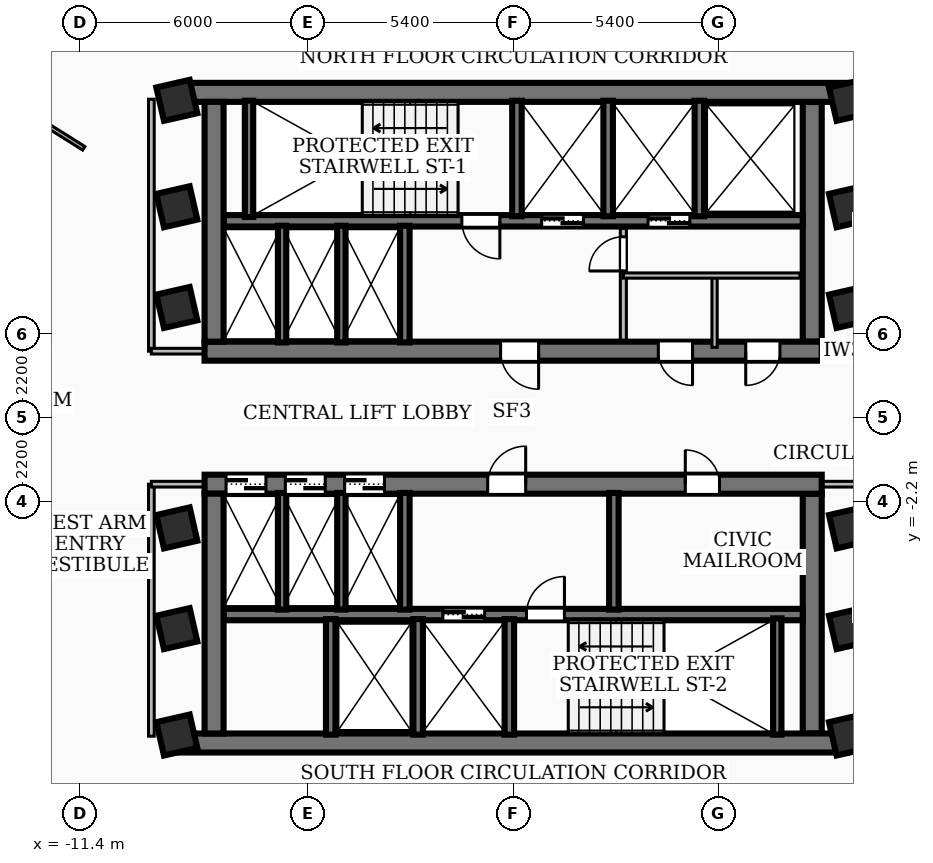
"""IFC4 building model, lengths in metres.
Left out: names, types, materials, properties, quantities, classifications, styles, units other than length and angle.
Written with IfcOpenShell. Run it as: python <this file> out.ifc"""

import sys

from ifc_helpers import new_model, si_unit, direction, frame, frame_2d, origin, origin_2d, place, context, subcontext, project, spatial, rectangle, extrude, element, fill, save


model = new_model("IFC4")
c1 = context("Model", 3, precision=1e-05, world=origin(), true_north=direction((0.0, 1.0)))
c2 = subcontext(c1, "Body", "Model", "MODEL_VIEW")
j1 = project(units=[si_unit("LENGTHUNIT", "METRE"), si_unit("PLANEANGLEUNIT", "RADIAN")], contexts=[c1])
p1 = place(None, origin())
s1 = spatial("IfcSite", under=j1, at=p1, CompositionType="ELEMENT")
p2 = place(p1, origin())
s2 = spatial("IfcBuilding", under=s1, at=p2, CompositionType="ELEMENT")
p3 = place(p2, frame((0.0, 0.0, 123.48)))
s3 = spatial("IfcBuildingStorey", under=s2, at=p3, CompositionType="ELEMENT", Elevation=123.48)
p4 = place(p3, frame((-8.78, 8.56, 0.0), z_axis=(0.0, 0.0, 1.0), x_axis=(1.0, 0.0, 0.0)))
e1 = element("IfcWall", 1, at=p4, inside=s3, PredefinedType="SHEAR", context=c2, shape_type="SweptSolid", body=[
    extrude(rectangle(XDim=17.56, YDim=0.5, at=frame_2d((8.78, 0.0))), origin(), (0.0, 0.0, 1.0), 3.34),
])
p5 = place(p3, frame((8.12, 1.75, 0.0), z_axis=(0.0, 0.0, 1.0), x_axis=(-1.0, 0.0, 0.0)))
e2 = element("IfcWall", 2, at=p5, inside=s3, PredefinedType="SHEAR", context=c2, shape_type="SweptSolid", body=[
    extrude(rectangle(XDim=16.24, YDim=0.5, at=frame_2d((8.12, 0.0))), origin(), (0.0, 0.0, 1.0), 3.34),
])
p6 = place(p5, frame((7.45, 0.0, 0.0)))
e3 = element("IfcOpeningElement", 3, at=p6, cuts=e2, PredefinedType="OPENING", context=c2, shape_type="SweptSolid", body=[
    extrude(rectangle(XDim=1.0, YDim=2.1, at=frame_2d((0.5, 1.05))), frame((0.0, 0.26, 0.0), z_axis=(0.0, -1.0, 0.0), x_axis=(1.0, 0.0, 0.0)), (0.0, 0.0, 1.0), 0.52),
])
p7 = place(p5, frame((3.4, 0.0, 0.0)))
e4 = element("IfcOpeningElement", 4, at=p7, cuts=e2, PredefinedType="OPENING", context=c2, shape_type="SweptSolid", body=[
    extrude(rectangle(XDim=0.9, YDim=2.06, at=frame_2d((0.45, 1.03))), frame((0.0, 0.26, 0.0), z_axis=(0.0, -1.0, 0.0), x_axis=(1.0, 0.0, 0.0)), (0.0, 0.0, 1.0), 0.52),
])
p8 = place(p5, frame((1.1, 0.0, 0.0)))
e5 = element("IfcOpeningElement", 5, at=p8, cuts=e2, PredefinedType="OPENING", context=c2, shape_type="SweptSolid", body=[
    extrude(rectangle(XDim=0.9, YDim=2.06, at=frame_2d((0.45, 1.03))), frame((0.0, 0.26, 0.0), z_axis=(0.0, -1.0, 0.0), x_axis=(1.0, 0.0, 0.0)), (0.0, 0.0, 1.0), 0.52),
])
for number, where, z_axis, x_axis in (
    (6, (-7.87, 2.0, 0.0), (0.0, 0.0, 1.0), (0.0, 1.0, 0.0)),
    (7, (7.87, 8.31, 0.0), (0.0, 0.0, 1.0), (0.0, -1.0, 0.0)),
):
    element("IfcWall", number, at=place(p3, frame(where, z_axis=z_axis, x_axis=x_axis)), inside=s3, PredefinedType="SHEAR", context=c2, shape_type="SweptSolid", body=[
        extrude(rectangle(XDim=6.31, YDim=0.5, at=frame_2d((3.155, 0.0))), origin(), (0.0, 0.0, 1.0), 3.34),
    ])
p9 = place(p3, frame((7.62, 5.18, 0.0), z_axis=(0.0, 0.0, 1.0), x_axis=(-1.0, 0.0, 0.0)))
e8 = element("IfcWall", 8, at=p9, inside=s3, PredefinedType="SOLIDWALL", context=c2, shape_type="SweptSolid", body=[
    extrude(rectangle(XDim=15.24, YDim=0.3, at=frame_2d((7.62, 0.0))), origin(), (0.0, 0.0, 1.0), 3.34),
])
p10 = place(p9, frame((5.77, 0.0, 0.0)))
e9 = element("IfcOpeningElement", 9, at=p10, cuts=e8, PredefinedType="OPENING", context=c2, shape_type="SweptSolid", body=[
    extrude(rectangle(XDim=1.1, YDim=2.15, at=frame_2d((0.55, 1.075))), frame((0.0, 0.16, 0.0), z_axis=(0.0, -1.0, 0.0), x_axis=(1.0, 0.0, 0.0)), (0.0, 0.0, 1.0), 0.32),
])
p11 = place(p9, frame((2.97, 0.0, 0.0)))
e10 = element("IfcOpeningElement", 10, at=p11, cuts=e8, PredefinedType="OPENING", context=c2, shape_type="SweptSolid", body=[
    extrude(rectangle(XDim=1.1, YDim=2.15, at=frame_2d((0.55, 1.075))), frame((0.0, 0.16, 0.0), z_axis=(0.0, -1.0, 0.0), x_axis=(1.0, 0.0, 0.0)), (0.0, 0.0, 1.0), 0.32),
])
p12 = place(p9, frame((7.97, 0.0, 0.0)))
e11 = element("IfcOpeningElement", 11, at=p12, cuts=e8, PredefinedType="OPENING", context=c2, shape_type="SweptSolid", body=[
    extrude(rectangle(XDim=1.0, YDim=2.1, at=frame_2d((0.5, 1.05))), frame((0.0, 0.16, 0.0), z_axis=(0.0, -1.0, 0.0), x_axis=(1.0, 0.0, 0.0)), (0.0, 0.0, 1.0), 0.32),
])
p13 = place(p3, frame((8.78, -8.56, 0.0), z_axis=(0.0, 0.0, 1.0), x_axis=(-1.0, 0.0, 0.0)))
e12 = element("IfcWall", 12, at=p13, inside=s3, PredefinedType="SHEAR", context=c2, shape_type="SweptSolid", body=[
    extrude(rectangle(XDim=17.56, YDim=0.5, at=frame_2d((8.78, 0.0))), origin(), (0.0, 0.0, 1.0), 3.34),
])
p14 = place(p3, frame((-8.12, -1.75, 0.0), z_axis=(0.0, 0.0, 1.0), x_axis=(1.0, 0.0, 0.0)))
e13 = element("IfcWall", 13, at=p14, inside=s3, PredefinedType="SHEAR", context=c2, shape_type="SweptSolid", body=[
    extrude(rectangle(XDim=16.24, YDim=0.5, at=frame_2d((8.12, 0.0))), origin(), (0.0, 0.0, 1.0), 3.34),
])
p15 = place(p14, frame((7.45, 0.0, 0.0)))
e14 = element("IfcOpeningElement", 14, at=p15, cuts=e13, PredefinedType="OPENING", context=c2, shape_type="SweptSolid", body=[
    extrude(rectangle(XDim=1.0, YDim=2.1, at=frame_2d((0.5, 1.05))), frame((0.0, 0.26, 0.0), z_axis=(0.0, -1.0, 0.0), x_axis=(1.0, 0.0, 0.0)), (0.0, 0.0, 1.0), 0.52),
])
p16 = place(p14, frame((12.65, 0.0, 0.0)))
e15 = element("IfcOpeningElement", 15, at=p16, cuts=e13, PredefinedType="OPENING", context=c2, shape_type="SweptSolid", body=[
    extrude(rectangle(XDim=0.9, YDim=2.06, at=frame_2d((0.45, 1.03))), frame((0.0, 0.26, 0.0), z_axis=(0.0, -1.0, 0.0), x_axis=(1.0, 0.0, 0.0)), (0.0, 0.0, 1.0), 0.52),
])
p17 = place(p14, frame((0.565, 0.0, 0.0)))
e16 = element("IfcOpeningElement", 16, at=p17, cuts=e13, PredefinedType="OPENING", context=c2, shape_type="SweptSolid", body=[
    extrude(rectangle(XDim=1.05, YDim=2.15, at=frame_2d((0.525, 1.075))), frame((0.0, 0.26, 0.0), z_axis=(0.0, -1.0, 0.0), x_axis=(1.0, 0.0, 0.0)), (0.0, 0.0, 1.0), 0.52),
])
p18 = place(p14, frame((2.125, 0.0, 0.0)))
e17 = element("IfcOpeningElement", 17, at=p18, cuts=e13, PredefinedType="OPENING", context=c2, shape_type="SweptSolid", body=[
    extrude(rectangle(XDim=1.05, YDim=2.15, at=frame_2d((0.525, 1.075))), frame((0.0, 0.26, 0.0), z_axis=(0.0, -1.0, 0.0), x_axis=(1.0, 0.0, 0.0)), (0.0, 0.0, 1.0), 0.52),
])
p19 = place(p14, frame((3.685, 0.0, 0.0)))
e18 = element("IfcOpeningElement", 18, at=p19, cuts=e13, PredefinedType="OPENING", context=c2, shape_type="SweptSolid", body=[
    extrude(rectangle(XDim=1.05, YDim=2.15, at=frame_2d((0.525, 1.075))), frame((0.0, 0.26, 0.0), z_axis=(0.0, -1.0, 0.0), x_axis=(1.0, 0.0, 0.0)), (0.0, 0.0, 1.0), 0.52),
])
for number, where, z_axis, x_axis in (
    (19, (-7.87, -8.31, 0.0), (0.0, 0.0, 1.0), (0.0, 1.0, 0.0)),
    (20, (7.87, -2.0, 0.0), (0.0, 0.0, 1.0), (0.0, -1.0, 0.0)),
):
    element("IfcWall", number, at=place(p3, frame(where, z_axis=z_axis, x_axis=x_axis)), inside=s3, PredefinedType="SHEAR", context=c2, shape_type="SweptSolid", body=[
        extrude(rectangle(XDim=6.31, YDim=0.5, at=frame_2d((3.155, 0.0))), origin(), (0.0, 0.0, 1.0), 3.34),
    ])
p20 = place(p3, frame((-7.62, -5.18, 0.0), z_axis=(0.0, 0.0, 1.0), x_axis=(1.0, 0.0, 0.0)))
e21 = element("IfcWall", 21, at=p20, inside=s3, PredefinedType="SOLIDWALL", context=c2, shape_type="SweptSolid", body=[
    extrude(rectangle(XDim=15.24, YDim=0.3, at=frame_2d((7.62, 0.0))), origin(), (0.0, 0.0, 1.0), 3.34),
])
p21 = place(p20, frame((5.77, 0.0, 0.0)))
e22 = element("IfcOpeningElement", 22, at=p21, cuts=e21, PredefinedType="OPENING", context=c2, shape_type="SweptSolid", body=[
    extrude(rectangle(XDim=1.1, YDim=2.15, at=frame_2d((0.55, 1.075))), frame((0.0, 0.16, 0.0), z_axis=(0.0, -1.0, 0.0), x_axis=(1.0, 0.0, 0.0)), (0.0, 0.0, 1.0), 0.32),
])
p22 = place(p20, frame((7.97, 0.0, 0.0)))
e23 = element("IfcOpeningElement", 23, at=p22, cuts=e21, PredefinedType="OPENING", context=c2, shape_type="SweptSolid", body=[
    extrude(rectangle(XDim=1.0, YDim=2.1, at=frame_2d((0.5, 1.05))), frame((0.0, 0.16, 0.0), z_axis=(0.0, -1.0, 0.0), x_axis=(1.0, 0.0, 0.0)), (0.0, 0.0, 1.0), 0.32),
])
for number, where, z_axis, x_axis in (
    (24, (-6.95, 5.28, 0.0), (0.0, 0.0, 1.0), (0.0, 1.0, 0.0)),
    (25, (6.95, -8.34, 0.0), (0.0, 0.0, 1.0), (0.0, 1.0, 0.0)),
):
    element("IfcWall", number, at=place(p3, frame(where, z_axis=z_axis, x_axis=x_axis)), inside=s3, PredefinedType="SOLIDWALL", context=c2, shape_type="SweptSolid", body=[
        extrude(rectangle(XDim=3.06, YDim=0.22, at=frame_2d((1.53, 0.0))), origin(), (0.0, 0.0, 1.0), 3.34),
    ])
for number, where, z_axis, x_axis in (
    (26, (0.1, 5.3, 0.0), (0.0, 0.0, 1.0), (0.0, 1.0, 0.0)),
    (27, (2.5, 5.3, 0.0), (0.0, 0.0, 1.0), (0.0, 1.0, 0.0)),
    (28, (4.9, 5.3, 0.0), (0.0, 0.0, 1.0), (0.0, 1.0, 0.0)),
):
    element("IfcWall", number, at=place(p3, frame(where, z_axis=z_axis, x_axis=x_axis)), inside=s3, PredefinedType="SOLIDWALL", context=c2, shape_type="SweptSolid", body=[
        extrude(rectangle(XDim=3.04, YDim=0.25, at=frame_2d((1.52, 0.0))), origin(), (0.0, 0.0, 1.0), 3.34),
    ])
p23 = place(p3, frame((-2.85, 1.98, 0.0), z_axis=(0.0, 0.0, 1.0), x_axis=(0.0, 1.0, 0.0)))
e29 = element("IfcWall", 29, at=p23, inside=s3, PredefinedType="SOLIDWALL", context=c2, shape_type="SweptSolid", body=[
    extrude(rectangle(XDim=3.07, YDim=0.25, at=frame_2d((1.535, 0.0))), origin(), (0.0, 0.0, 1.0), 3.34),
])
for number, where, z_axis, x_axis in (
    (30, (-0.1, -8.34, 0.0), (0.0, 0.0, 1.0), (0.0, 1.0, 0.0)),
    (31, (-2.5, -8.34, 0.0), (0.0, 0.0, 1.0), (0.0, 1.0, 0.0)),
    (32, (-4.8, -8.34, 0.0), (0.0, 0.0, 1.0), (0.0, 1.0, 0.0)),
):
    element("IfcWall", number, at=place(p3, frame(where, z_axis=z_axis, x_axis=x_axis)), inside=s3, PredefinedType="SOLIDWALL", context=c2, shape_type="SweptSolid", body=[
        extrude(rectangle(XDim=3.04, YDim=0.25, at=frame_2d((1.52, 0.0))), origin(), (0.0, 0.0, 1.0), 3.34),
    ])
for number, where, z_axis, x_axis in (
    (33, (-2.85, -5.05, 0.0), (0.0, 0.0, 1.0), (0.0, 1.0, 0.0)),
    (34, (2.65, -5.05, 0.0), (0.0, 0.0, 1.0), (0.0, 1.0, 0.0)),
):
    element("IfcWall", number, at=place(p3, frame(where, z_axis=z_axis, x_axis=x_axis)), inside=s3, PredefinedType="SOLIDWALL", context=c2, shape_type="SweptSolid", body=[
        extrude(rectangle(XDim=3.07, YDim=0.25, at=frame_2d((1.535, 0.0))), origin(), (0.0, 0.0, 1.0), 3.34),
    ])
for number, where, z_axis, x_axis in (
    (35, (-6.08, 1.98, 0.0), (0.0, 0.0, 1.0), (0.0, 1.0, 0.0)),
    (36, (-4.52, 1.98, 0.0), (0.0, 0.0, 1.0), (0.0, 1.0, 0.0)),
    (37, (-6.08, -5.05, 0.0), (0.0, 0.0, 1.0), (0.0, 1.0, 0.0)),
    (38, (-4.52, -5.05, 0.0), (0.0, 0.0, 1.0), (0.0, 1.0, 0.0)),
):
    element("IfcWall", number, at=place(p3, frame(where, z_axis=z_axis, x_axis=x_axis)), inside=s3, PredefinedType="SOLIDWALL", context=c2, shape_type="SweptSolid", body=[
        extrude(rectangle(XDim=3.07, YDim=0.22, at=frame_2d((1.535, 0.0))), origin(), (0.0, 0.0, 1.0), 3.34),
    ])
for number, where, z_axis, x_axis in (
    (39, (-8.85, -5.55, 0.0), (0.0, 0.0, 1.0), (0.975, 0.223, 0.0)),
    (40, (-8.85, -2.9, 0.0), (0.0, 0.0, 1.0), (0.975, 0.223, 0.0)),
    (41, (-8.85, 2.9, 0.0), (0.0, 0.0, 1.0), (0.975, 0.223, 0.0)),
    (42, (-8.85, 5.55, 0.0), (0.0, 0.0, 1.0), (0.975, 0.223, 0.0)),
    (43, (8.85, -5.55, 0.0), (0.0, 0.0, 1.0), (0.975, 0.223, 0.0)),
    (44, (8.85, -2.9, 0.0), (0.0, 0.0, 1.0), (0.975, 0.223, 0.0)),
    (45, (8.85, 2.9, 0.0), (0.0, 0.0, 1.0), (0.975, 0.223, 0.0)),
    (46, (8.85, 5.55, 0.0), (0.0, 0.0, 1.0), (0.975, 0.223, 0.0)),
    (47, (-8.85, 8.35, 0.0), (0.0, 0.0, 1.0), (0.975, 0.223, 0.0)),
    (48, (8.85, -8.35, 0.0), (0.0, 0.0, 1.0), (0.975, 0.223, 0.0)),
    (49, (8.85, 8.35, 0.0), (0.0, 0.0, 1.0), (0.975, 0.223, 0.0)),
    (50, (-8.85, -8.35, 0.0), (0.0, 0.0, 1.0), (0.975, 0.223, 0.0)),
):
    element("IfcColumn", number, at=place(p3, frame(where, z_axis=z_axis, x_axis=x_axis)), inside=s3, PredefinedType="COLUMN", context=c2, shape_type="SweptSolid", body=[
        extrude(rectangle(XDim=0.9, YDim=0.9, at=origin_2d()), origin(), (0.0, 0.0, 1.0), 3.6),
    ])
p24 = place(p3, frame((-11.182, -15.857, 0.0), z_axis=(0.0, 0.0, 1.0), x_axis=(-0.223278912438, 0.974754598481, 0.0)))
e51 = element("IfcWall", 51, at=p24, inside=s3, PredefinedType="SOLIDWALL", context=c2, shape_type="SweptSolid", body=[
    extrude(rectangle(XDim=6.759, YDim=0.22, at=frame_2d((3.379, 0.0))), origin(), (0.0, 0.0, 1.0), 2.644),
])
p25 = place(p3, frame((2.9, 2.04, 0.0), z_axis=(0.0, 0.0, 1.0), x_axis=(0.0, 1.0, 0.0)))
e52 = element("IfcWall", 52, at=p25, inside=s3, PredefinedType="PARTITIONING", context=c2, shape_type="SweptSolid", body=[
    extrude(rectangle(XDim=2.94, YDim=0.16, at=frame_2d((1.47, 0.0))), origin(), (0.0, 0.0, 1.0), 2.57),
])
p26 = place(p25, frame((1.82, 0.0, 0.0)))
e53 = element("IfcOpeningElement", 53, at=p26, cuts=e52, PredefinedType="OPENING", context=c2, shape_type="SweptSolid", body=[
    extrude(rectangle(XDim=0.9, YDim=2.06, at=frame_2d((0.45, 1.03))), frame((0.0, 0.09, 0.0), z_axis=(0.0, -1.0, 0.0), x_axis=(1.0, 0.0, 0.0)), (0.0, 0.0, 1.0), 0.18),
])
p27 = place(p3, frame((2.9, 3.74, 0.0), z_axis=(0.0, 0.0, 1.0), x_axis=(1.0, 0.0, 0.0)))
e54 = element("IfcWall", 54, at=p27, inside=s3, PredefinedType="PARTITIONING", context=c2, shape_type="SweptSolid", body=[
    extrude(rectangle(XDim=4.65, YDim=0.138, at=frame_2d((2.325, 0.0))), origin(), (0.0, 0.0, 1.0), 3.34),
])
p28 = place(p3, frame((5.3, 1.85, 0.0), z_axis=(0.0, 0.0, 1.0), x_axis=(0.0, 1.0, 0.0)))
e55 = element("IfcWall", 55, at=p28, inside=s3, PredefinedType="PARTITIONING", context=c2, shape_type="SweptSolid", body=[
    extrude(rectangle(XDim=1.89, YDim=0.138, at=frame_2d((0.945, 0.0))), origin(), (0.0, 0.0, 1.0), 2.57),
])
p29 = place(p3, frame((-9.52, 1.75, 0.0), z_axis=(0.0, 0.0, 1.0), x_axis=(0.0, 1.0, 0.0)))
e56 = element("IfcWall", 56, at=p29, inside=s3, PredefinedType="PARTITIONING", context=c2, shape_type="SweptSolid", body=[
    extrude(rectangle(XDim=6.63, YDim=0.15, at=frame_2d((3.315, 0.0))), origin(), (0.0, 0.0, 1.0), 2.57),
])
p30 = place(p3, frame((-7.85, 1.75, 0.0), z_axis=(0.0, 0.0, 1.0), x_axis=(-1.0, 0.0, 0.0)))
e57 = element("IfcWall", 57, at=p30, inside=s3, PredefinedType="PARTITIONING", context=c2, shape_type="SweptSolid", body=[
    extrude(rectangle(XDim=1.67, YDim=0.15, at=frame_2d((0.835, 0.0))), origin(), (0.0, 0.0, 1.0), 2.57),
])
p31 = place(p3, frame((-9.52, -8.38, 0.0), z_axis=(0.0, 0.0, 1.0), x_axis=(0.0, 1.0, 0.0)))
e58 = element("IfcWall", 58, at=p31, inside=s3, PredefinedType="PARTITIONING", context=c2, shape_type="SweptSolid", body=[
    extrude(rectangle(XDim=6.63, YDim=0.15, at=frame_2d((3.315, 0.0))), origin(), (0.0, 0.0, 1.0), 2.57),
])
for number, where, z_axis, x_axis in (
    (59, (-7.85, -1.75, 0.0), (0.0, 0.0, 1.0), (-1.0, 0.0, 0.0)),
    (60, (7.85, 1.75, 0.0), (0.0, 0.0, 1.0), (1.0, 0.0, 0.0)),
    (61, (7.85, -1.75, 0.0), (0.0, 0.0, 1.0), (1.0, 0.0, 0.0)),
):
    element("IfcWall", number, at=place(p3, frame(where, z_axis=z_axis, x_axis=x_axis)), inside=s3, PredefinedType="PARTITIONING", context=c2, shape_type="SweptSolid", body=[
        extrude(rectangle(XDim=1.67, YDim=0.15, at=frame_2d((0.835, 0.0))), origin(), (0.0, 0.0, 1.0), 2.57),
    ])
p32 = place(p3, frame((-11.3, 7.089, 0.0), z_axis=(0.0, 0.0, 1.0), x_axis=(-0.847172398776, 0.531318103167, 0.0)))
e62 = element("IfcWall", 62, at=p32, inside=s3, PredefinedType="PARTITIONING", context=c2, shape_type="SweptSolid", body=[
    extrude(rectangle(XDim=6.335, YDim=0.11, at=frame_2d((3.167, 0.0))), origin(), (0.0, 0.0, 1.0), 3.34),
])
p33 = place(p3, frame((-11.692, -12.957, 0.0), z_axis=(0.0, 0.0, 1.0), x_axis=(-0.223262093598, 0.97475845088, 0.0)))
e63 = element("IfcWall", 63, at=p33, inside=s3, PredefinedType="PARTITIONING", context=c2, shape_type="SweptSolid", body=[
    extrude(rectangle(XDim=20.04, YDim=0.11, at=frame_2d((10.02, 0.0))), origin(), (0.0, 0.0, 1.0), 2.57),
])
p34 = place(p33, frame((9.42, 0.0, 0.0)))
e64 = element("IfcOpeningElement", 64, at=p34, cuts=e63, PredefinedType="OPENING", context=c2, shape_type="SweptSolid", body=[
    extrude(rectangle(XDim=1.2, YDim=2.1, at=frame_2d((0.6, 1.05))), frame((0.0, 0.065, 0.0), z_axis=(0.0, -1.0, 0.0), x_axis=(1.0, 0.0, 0.0)), (0.0, 0.0, 1.0), 0.13),
])
p35 = place(p6, origin())
e65 = element("IfcDoor", 65, at=p35, inside=s3, OperationType="SINGLE_SWING_LEFT", PredefinedType="DOOR", context=c2, shape_type="SweptSolid", body=[
    extrude(rectangle(XDim=1.0, YDim=2.1, at=frame_2d((0.5, 1.05))), frame((0.0, 0.025, 0.0), z_axis=(0.0, -1.0, 0.0), x_axis=(1.0, 0.0, 0.0)), (0.0, 0.0, 1.0), 0.05),
])
fill(e3, e65)
p36 = place(p15, origin())
e66 = element("IfcDoor", 66, at=p36, inside=s3, OperationType="SINGLE_SWING_RIGHT", PredefinedType="DOOR", context=c2, shape_type="SweptSolid", body=[
    extrude(rectangle(XDim=1.0, YDim=2.1, at=frame_2d((0.5, 1.05))), frame((0.0, 0.025, 0.0), z_axis=(0.0, -1.0, 0.0), x_axis=(1.0, 0.0, 0.0)), (0.0, 0.0, 1.0), 0.05),
])
fill(e14, e66)
p37 = place(p10, origin())
e67 = element("IfcDoor", 67, at=p37, inside=s3, OperationType="DOUBLE_DOOR_SLIDING", PredefinedType="DOOR", context=c2, shape_type="SweptSolid", body=[
    extrude(rectangle(XDim=1.1, YDim=2.15, at=frame_2d((0.55, 1.075))), frame((0.0, 0.025, 0.0), z_axis=(0.0, -1.0, 0.0), x_axis=(1.0, 0.0, 0.0)), (0.0, 0.0, 1.0), 0.05),
])
fill(e9, e67)
p38 = place(p11, origin())
e68 = element("IfcDoor", 68, at=p38, inside=s3, OperationType="DOUBLE_DOOR_SLIDING", PredefinedType="DOOR", context=c2, shape_type="SweptSolid", body=[
    extrude(rectangle(XDim=1.1, YDim=2.15, at=frame_2d((0.55, 1.075))), frame((0.0, 0.025, 0.0), z_axis=(0.0, -1.0, 0.0), x_axis=(1.0, 0.0, 0.0)), (0.0, 0.0, 1.0), 0.05),
])
fill(e10, e68)
p39 = place(p12, origin())
e69 = element("IfcDoor", 69, at=p39, inside=s3, OperationType="SINGLE_SWING_LEFT", PredefinedType="DOOR", context=c2, shape_type="SweptSolid", body=[
    extrude(rectangle(XDim=1.0, YDim=2.1, at=frame_2d((0.5, 1.05))), frame((0.0, 0.025, 0.0), z_axis=(0.0, -1.0, 0.0), x_axis=(1.0, 0.0, 0.0)), (0.0, 0.0, 1.0), 0.05),
])
fill(e11, e69)
p40 = place(p21, origin())
e70 = element("IfcDoor", 70, at=p40, inside=s3, OperationType="DOUBLE_DOOR_SLIDING", PredefinedType="DOOR", context=c2, shape_type="SweptSolid", body=[
    extrude(rectangle(XDim=1.1, YDim=2.15, at=frame_2d((0.55, 1.075))), frame((0.0, 0.025, 0.0), z_axis=(0.0, -1.0, 0.0), x_axis=(1.0, 0.0, 0.0)), (0.0, 0.0, 1.0), 0.05),
])
fill(e22, e70)
p41 = place(p22, origin())
e71 = element("IfcDoor", 71, at=p41, inside=s3, OperationType="SINGLE_SWING_RIGHT", PredefinedType="DOOR", context=c2, shape_type="SweptSolid", body=[
    extrude(rectangle(XDim=1.0, YDim=2.1, at=frame_2d((0.5, 1.05))), frame((0.0, 0.025, 0.0), z_axis=(0.0, -1.0, 0.0), x_axis=(1.0, 0.0, 0.0)), (0.0, 0.0, 1.0), 0.05),
])
fill(e23, e71)
p42 = place(p16, origin())
e72 = element("IfcDoor", 72, at=p42, inside=s3, OperationType="SINGLE_SWING_LEFT", PredefinedType="DOOR", context=c2, shape_type="SweptSolid", body=[
    extrude(rectangle(XDim=0.9, YDim=2.06, at=frame_2d((0.45, 1.03))), frame((0.0, 0.025, 0.0), z_axis=(0.0, -1.0, 0.0), x_axis=(1.0, 0.0, 0.0)), (0.0, 0.0, 1.0), 0.05),
])
fill(e15, e72)
p43 = place(p17, origin())
e73 = element("IfcDoor", 73, at=p43, inside=s3, OperationType="DOUBLE_DOOR_SLIDING", PredefinedType="DOOR", context=c2, shape_type="SweptSolid", body=[
    extrude(rectangle(XDim=1.05, YDim=2.15, at=frame_2d((0.525, 1.075))), frame((0.0, 0.025, 0.0), z_axis=(0.0, -1.0, 0.0), x_axis=(1.0, 0.0, 0.0)), (0.0, 0.0, 1.0), 0.05),
])
fill(e16, e73)
p44 = place(p18, origin())
e74 = element("IfcDoor", 74, at=p44, inside=s3, OperationType="DOUBLE_DOOR_SLIDING", PredefinedType="DOOR", context=c2, shape_type="SweptSolid", body=[
    extrude(rectangle(XDim=1.05, YDim=2.15, at=frame_2d((0.525, 1.075))), frame((0.0, 0.025, 0.0), z_axis=(0.0, -1.0, 0.0), x_axis=(1.0, 0.0, 0.0)), (0.0, 0.0, 1.0), 0.05),
])
fill(e17, e74)
p45 = place(p19, origin())
e75 = element("IfcDoor", 75, at=p45, inside=s3, OperationType="DOUBLE_DOOR_SLIDING", PredefinedType="DOOR", context=c2, shape_type="SweptSolid", body=[
    extrude(rectangle(XDim=1.05, YDim=2.15, at=frame_2d((0.525, 1.075))), frame((0.0, 0.025, 0.0), z_axis=(0.0, -1.0, 0.0), x_axis=(1.0, 0.0, 0.0)), (0.0, 0.0, 1.0), 0.05),
])
fill(e18, e75)
p46 = place(p7, origin())
e76 = element("IfcDoor", 76, at=p46, inside=s3, OperationType="SINGLE_SWING_LEFT", PredefinedType="DOOR", context=c2, shape_type="SweptSolid", body=[
    extrude(rectangle(XDim=0.9, YDim=2.06, at=frame_2d((0.45, 1.03))), frame((0.0, 0.025, 0.0), z_axis=(0.0, -1.0, 0.0), x_axis=(1.0, 0.0, 0.0)), (0.0, 0.0, 1.0), 0.05),
])
fill(e4, e76)
p47 = place(p8, origin())
e77 = element("IfcDoor", 77, at=p47, inside=s3, OperationType="SINGLE_SWING_RIGHT", PredefinedType="DOOR", context=c2, shape_type="SweptSolid", body=[
    extrude(rectangle(XDim=0.9, YDim=2.06, at=frame_2d((0.45, 1.03))), frame((0.0, 0.025, 0.0), z_axis=(0.0, -1.0, 0.0), x_axis=(1.0, 0.0, 0.0)), (0.0, 0.0, 1.0), 0.05),
])
fill(e5, e77)
p48 = place(p26, origin())
e78 = element("IfcDoor", 78, at=p48, inside=s3, OperationType="SINGLE_SWING_LEFT", PredefinedType="DOOR", context=c2, shape_type="SweptSolid", body=[
    extrude(rectangle(XDim=0.9, YDim=2.06, at=frame_2d((0.45, 1.03))), frame((0.0, 0.025, 0.0), z_axis=(0.0, -1.0, 0.0), x_axis=(1.0, 0.0, 0.0)), (0.0, 0.0, 1.0), 0.05),
])
fill(e53, e78)
save(model, sys.argv[1])
